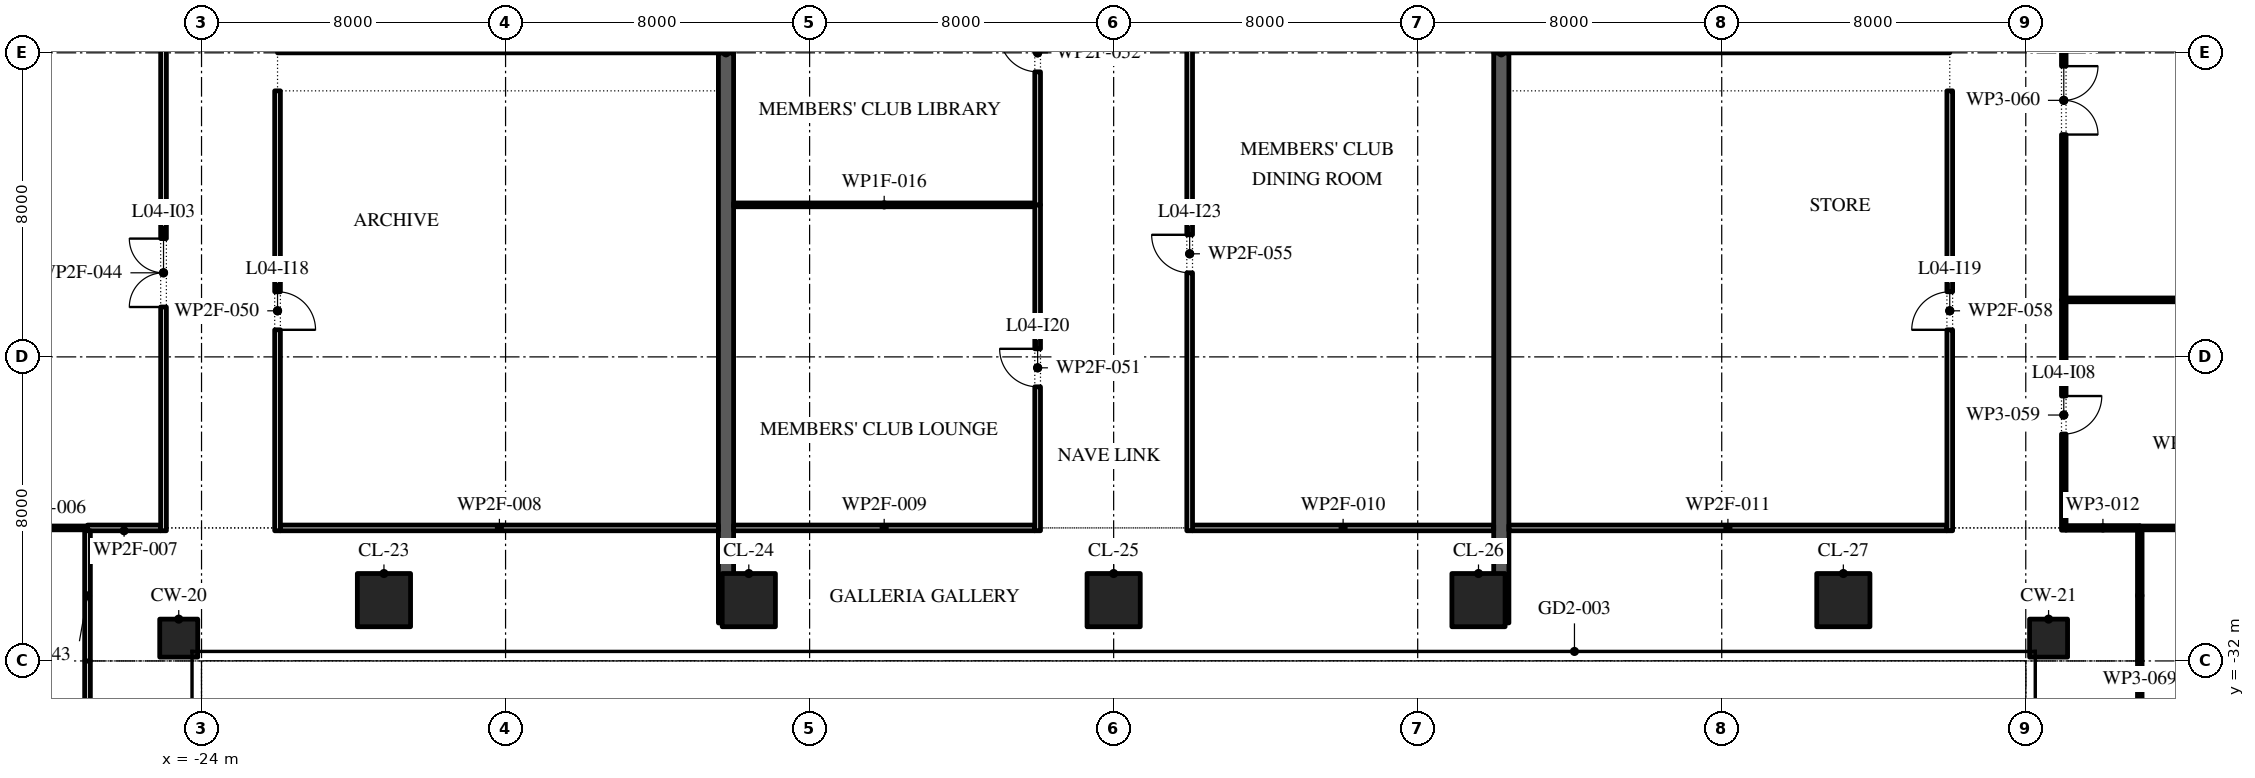
"""IFC4 building model, lengths in metres.
Left out: names, types, materials, properties, quantities, classifications, styles, units other than length and angle.
Written with IfcOpenShell. Run it as: python <this file> out.ifc"""

import sys

from ifc_helpers import new_model, si_unit, direction, frame, frame_2d, origin, origin_2d, place, context, subcontext, project, spatial, rectangle, extrude, element, fill, save


model = new_model("IFC4")
c1 = context("Model", 3, precision=1e-05, world=origin(), true_north=direction((0.0, 1.0)))
c2 = subcontext(c1, "Body", "Model", "MODEL_VIEW")
j1 = project(units=[si_unit("LENGTHUNIT", "METRE"), si_unit("PLANEANGLEUNIT", "RADIAN")], contexts=[c1])
p1 = place(None, origin())
s1 = spatial("IfcSite", under=j1, at=p1, CompositionType="ELEMENT")
p2 = place(p1, origin())
s2 = spatial("IfcBuilding", under=s1, at=p2, CompositionType="ELEMENT")
p3 = place(p2, frame((0.0, 0.0, 24.0)))
s3 = spatial("IfcBuildingStorey", under=s2, at=p3, CompositionType="ELEMENT", Elevation=24.0)
for number, where, z_axis, x_axis in (
    (1, (-24.6, -31.4, 0.0), (0.0, 0.0, 1.0), (1.0, 0.0, 0.0)),
    (2, (24.6, -31.4, 0.0), (0.0, 0.0, 1.0), (1.0, 0.0, 0.0)),
):
    element("IfcColumn", number, at=place(p3, frame(where, z_axis=z_axis, x_axis=x_axis)), inside=s3, PredefinedType="COLUMN", context=c2, shape_type="SweptSolid", body=[
        extrude(rectangle(XDim=1.0, YDim=1.0, at=origin_2d()), origin(), (0.0, 0.0, 1.0), 4.8),
    ])
for number, where, z_axis, x_axis in (
    (3, (-19.2, -30.4, 0.0), (0.0, 0.0, 1.0), (1.0, 0.0, 0.0)),
    (4, (-9.6, -30.4, 0.0), (0.0, 0.0, 1.0), (1.0, 0.0, 0.0)),
    (5, (0.0, -30.4, 0.0), (0.0, 0.0, 1.0), (1.0, 0.0, 0.0)),
    (6, (9.6, -30.4, 0.0), (0.0, 0.0, 1.0), (1.0, 0.0, 0.0)),
    (7, (19.2, -30.4, 0.0), (0.0, 0.0, 1.0), (1.0, 0.0, 0.0)),
):
    element("IfcColumn", number, at=place(p3, frame(where, z_axis=z_axis, x_axis=x_axis)), inside=s3, PredefinedType="COLUMN", context=c2, shape_type="SweptSolid", body=[
        extrude(rectangle(XDim=1.4, YDim=1.4, at=origin_2d()), origin(), (0.0, 0.0, 1.0), 4.8),
    ])
for number, where, z_axis, x_axis in (
    (8, (-10.2, -31.0, 0.0), (0.0, 0.0, 1.0), (0.0, 1.0, 0.0)),
    (9, (10.2, -31.0, 0.0), (0.0, 0.0, 1.0), (0.0, 1.0, 0.0)),
):
    element("IfcWall", number, at=place(p3, frame(where, z_axis=z_axis, x_axis=x_axis)), inside=s3, PredefinedType="SHEAR", context=c2, shape_type="SweptSolid", body=[
        extrude(rectangle(XDim=15.0, YDim=0.4, at=frame_2d((7.5, 0.0))), origin(), (0.0, 0.0, 1.0), 4.5),
    ])
p4 = place(p3, frame((-29.9, -28.5, 0.0), z_axis=(0.0, 0.0, 1.0), x_axis=(1.0, 0.0, 0.0)))
e10 = element("IfcWall", 10, at=p4, inside=s3, PredefinedType="PARTITIONING", context=c2, shape_type="SweptSolid", body=[
    extrude(rectangle(XDim=2.9, YDim=0.1, at=frame_2d((1.45, 0.0))), origin(), (0.0, 0.0, 1.0), 4.5),
])
p5 = place(p3, frame((-27.0, -28.5, 0.0), z_axis=(0.0, 0.0, 1.0), x_axis=(1.0, 0.0, 0.0)))
e11 = element("IfcWall", 11, at=p5, inside=s3, PredefinedType="PARTITIONING", context=c2, shape_type="SweptSolid", body=[
    extrude(rectangle(XDim=1.925, YDim=0.15, at=frame_2d((0.962, 0.0))), origin(), (0.0, 0.0, 1.0), 4.5),
])
p6 = place(p3, frame((-21.925, -28.5, 0.0), z_axis=(0.0, 0.0, 1.0), x_axis=(1.0, 0.0, 0.0)))
e12 = element("IfcWall", 12, at=p6, inside=s3, PredefinedType="PARTITIONING", context=c2, shape_type="SweptSolid", body=[
    extrude(rectangle(XDim=11.525, YDim=0.15, at=frame_2d((5.763, 0.0))), origin(), (0.0, 0.0, 1.0), 4.5),
])
for number, where, z_axis, x_axis in (
    (13, (-10.0, -28.5, 0.0), (0.0, 0.0, 1.0), (1.0, 0.0, 0.0)),
    (14, (2.075, -28.5, 0.0), (0.0, 0.0, 1.0), (1.0, 0.0, 0.0)),
):
    element("IfcWall", number, at=place(p3, frame(where, z_axis=z_axis, x_axis=x_axis)), inside=s3, PredefinedType="PARTITIONING", context=c2, shape_type="SweptSolid", body=[
        extrude(rectangle(XDim=7.925, YDim=0.15, at=frame_2d((3.962, 0.0))), origin(), (0.0, 0.0, 1.0), 4.5),
    ])
p7 = place(p3, frame((10.4, -28.5, 0.0), z_axis=(0.0, 0.0, 1.0), x_axis=(1.0, 0.0, 0.0)))
e15 = element("IfcWall", 15, at=p7, inside=s3, PredefinedType="PARTITIONING", context=c2, shape_type="SweptSolid", body=[
    extrude(rectangle(XDim=11.525, YDim=0.15, at=frame_2d((5.763, 0.0))), origin(), (0.0, 0.0, 1.0), 4.5),
])
p8 = place(p3, frame((25.06, -28.5, 0.0), z_axis=(0.0, 0.0, 1.0), x_axis=(1.0, 0.0, 0.0)))
e16 = element("IfcWall", 16, at=p8, inside=s3, PredefinedType="PARTITIONING", context=c2, shape_type="SweptSolid", body=[
    extrude(rectangle(XDim=1.94, YDim=0.12, at=frame_2d((0.97, 0.0))), origin(), (0.0, 0.0, 1.0), 4.5),
])
p9 = place(p3, frame((27.0, -28.5, 0.0), z_axis=(0.0, 0.0, 1.0), x_axis=(1.0, 0.0, 0.0)))
e17 = element("IfcWall", 17, at=p9, inside=s3, PredefinedType="PARTITIONING", context=c2, shape_type="SweptSolid", body=[
    extrude(rectangle(XDim=2.9, YDim=0.1, at=frame_2d((1.45, 0.0))), origin(), (0.0, 0.0, 1.0), 4.5),
])
p10 = place(p3, frame((25.06, -22.5, 0.0), z_axis=(0.0, 0.0, 1.0), x_axis=(1.0, 0.0, 0.0)))
e18 = element("IfcWall", 18, at=p10, inside=s3, PredefinedType="PARTITIONING", context=c2, shape_type="SweptSolid", body=[
    extrude(rectangle(XDim=18.44, YDim=0.1, at=frame_2d((9.22, 0.0))), origin(), (0.0, 0.0, 1.0), 4.5),
])
p11 = place(p3, frame((-10.0, -20.0, 0.0), z_axis=(0.0, 0.0, 1.0), x_axis=(1.0, 0.0, 0.0)))
e19 = element("IfcWall", 19, at=p11, inside=s3, PredefinedType="PARTITIONING", context=c2, shape_type="SweptSolid", body=[
    extrude(rectangle(XDim=7.925, YDim=0.1, at=frame_2d((3.962, 0.0))), origin(), (0.0, 0.0, 1.0), 4.5),
])
p12 = place(p3, frame((-27.0, -42.0, 0.0), z_axis=(0.0, 0.0, 1.0), x_axis=(0.0, 1.0, 0.0)))
e20 = element("IfcWall", 20, at=p12, inside=s3, PredefinedType="PARTITIONING", context=c2, shape_type="SweptSolid", body=[
    extrude(rectangle(XDim=10.0, YDim=0.15, at=frame_2d((5.0, 0.0))), origin(), (0.0, 0.0, 1.0), 4.5),
])
p13 = place(p12, frame((4.1, 0.0, 0.0)))
e21 = element("IfcOpeningElement", 21, at=p13, cuts=e20, PredefinedType="OPENING", context=c2, shape_type="SweptSolid", body=[
    extrude(rectangle(XDim=1.8, YDim=2.1, at=frame_2d((0.9, 1.05))), frame((0.0, 0.085, 0.0), z_axis=(0.0, -1.0, 0.0), x_axis=(1.0, 0.0, 0.0)), (0.0, 0.0, 1.0), 0.17),
])
p14 = place(p3, frame((-27.0, -32.0, 0.0), z_axis=(0.0, 0.0, 1.0), x_axis=(0.0, 1.0, 0.0)))
e22 = element("IfcWall", 22, at=p14, inside=s3, PredefinedType="PARTITIONING", context=c2, shape_type="SweptSolid", body=[
    extrude(rectangle(XDim=3.425, YDim=0.15, at=frame_2d((1.712, 0.0))), origin(), (0.0, 0.0, 1.0), 4.5),
])
p15 = place(p3, frame((-25.0, -28.575, 0.0), z_axis=(0.0, 0.0, 1.0), x_axis=(0.0, 1.0, 0.0)))
e23 = element("IfcWall", 23, at=p15, inside=s3, PredefinedType="PARTITIONING", context=c2, shape_type="SweptSolid", body=[
    extrude(rectangle(XDim=13.575, YDim=0.15, at=frame_2d((6.788, 0.0))), origin(), (0.0, 0.0, 1.0), 4.5),
])
p16 = place(p15, frame((5.887, 0.0, 0.0)))
e24 = element("IfcOpeningElement", 24, at=p16, cuts=e23, PredefinedType="OPENING", context=c2, shape_type="SweptSolid", body=[
    extrude(rectangle(XDim=1.8, YDim=2.1, at=frame_2d((0.9, 1.05))), frame((0.0, 0.085, 0.0), z_axis=(0.0, -1.0, 0.0), x_axis=(1.0, 0.0, 0.0)), (0.0, 0.0, 1.0), 0.17),
])
p17 = place(p3, frame((-22.0, -28.575, 0.0), z_axis=(0.0, 0.0, 1.0), x_axis=(0.0, 1.0, 0.0)))
e25 = element("IfcWall", 25, at=p17, inside=s3, PredefinedType="PARTITIONING", context=c2, shape_type="SweptSolid", body=[
    extrude(rectangle(XDim=11.575, YDim=0.15, at=frame_2d((5.788, 0.0))), origin(), (0.0, 0.0, 1.0), 4.5),
])
p18 = place(p17, frame((5.288, 0.0, 0.0)))
e26 = element("IfcOpeningElement", 26, at=p18, cuts=e25, PredefinedType="OPENING", context=c2, shape_type="SweptSolid", body=[
    extrude(rectangle(XDim=1.0, YDim=2.1, at=frame_2d((0.5, 1.05))), frame((0.0, 0.085, 0.0), z_axis=(0.0, -1.0, 0.0), x_axis=(1.0, 0.0, 0.0)), (0.0, 0.0, 1.0), 0.17),
])
p19 = place(p3, frame((-2.0, -28.575, 0.0), z_axis=(0.0, 0.0, 1.0), x_axis=(0.0, 1.0, 0.0)))
e27 = element("IfcWall", 27, at=p19, inside=s3, PredefinedType="PARTITIONING", context=c2, shape_type="SweptSolid", body=[
    extrude(rectangle(XDim=8.575, YDim=0.15, at=frame_2d((4.288, 0.0))), origin(), (0.0, 0.0, 1.0), 4.5),
])
p20 = place(p19, frame((3.788, 0.0, 0.0)))
e28 = element("IfcOpeningElement", 28, at=p20, cuts=e27, PredefinedType="OPENING", context=c2, shape_type="SweptSolid", body=[
    extrude(rectangle(XDim=1.0, YDim=2.1, at=frame_2d((0.5, 1.05))), frame((0.0, 0.085, 0.0), z_axis=(0.0, -1.0, 0.0), x_axis=(1.0, 0.0, 0.0)), (0.0, 0.0, 1.0), 0.17),
])
p21 = place(p3, frame((-2.0, -20.0, 0.0), z_axis=(0.0, 0.0, 1.0), x_axis=(0.0, 1.0, 0.0)))
e29 = element("IfcWall", 29, at=p21, inside=s3, PredefinedType="PARTITIONING", context=c2, shape_type="SweptSolid", body=[
    extrude(rectangle(XDim=8.0, YDim=0.15, at=frame_2d((4.0, 0.0))), origin(), (0.0, 0.0, 1.0), 4.5),
])
p22 = place(p21, frame((3.5, 0.0, 0.0)))
e30 = element("IfcOpeningElement", 30, at=p22, cuts=e29, PredefinedType="OPENING", context=c2, shape_type="SweptSolid", body=[
    extrude(rectangle(XDim=1.0, YDim=2.1, at=frame_2d((0.5, 1.05))), frame((0.0, 0.085, 0.0), z_axis=(0.0, -1.0, 0.0), x_axis=(1.0, 0.0, 0.0)), (0.0, 0.0, 1.0), 0.17),
])
p23 = place(p3, frame((2.0, -28.575, 0.0), z_axis=(0.0, 0.0, 1.0), x_axis=(0.0, 1.0, 0.0)))
e31 = element("IfcWall", 31, at=p23, inside=s3, PredefinedType="PARTITIONING", context=c2, shape_type="SweptSolid", body=[
    extrude(rectangle(XDim=14.575, YDim=0.15, at=frame_2d((7.288, 0.0))), origin(), (0.0, 0.0, 1.0), 4.5),
])
p24 = place(p23, frame((6.788, 0.0, 0.0)))
e32 = element("IfcOpeningElement", 32, at=p24, cuts=e31, PredefinedType="OPENING", context=c2, shape_type="SweptSolid", body=[
    extrude(rectangle(XDim=1.0, YDim=2.1, at=frame_2d((0.5, 1.05))), frame((0.0, 0.085, 0.0), z_axis=(0.0, -1.0, 0.0), x_axis=(1.0, 0.0, 0.0)), (0.0, 0.0, 1.0), 0.17),
])
p25 = place(p3, frame((22.0, -28.575, 0.0), z_axis=(0.0, 0.0, 1.0), x_axis=(0.0, 1.0, 0.0)))
e33 = element("IfcWall", 33, at=p25, inside=s3, PredefinedType="PARTITIONING", context=c2, shape_type="SweptSolid", body=[
    extrude(rectangle(XDim=11.575, YDim=0.15, at=frame_2d((5.788, 0.0))), origin(), (0.0, 0.0, 1.0), 4.5),
])
p26 = place(p25, frame((5.288, 0.0, 0.0)))
e34 = element("IfcOpeningElement", 34, at=p26, cuts=e33, PredefinedType="OPENING", context=c2, shape_type="SweptSolid", body=[
    extrude(rectangle(XDim=1.0, YDim=2.1, at=frame_2d((0.5, 1.05))), frame((0.0, 0.085, 0.0), z_axis=(0.0, -1.0, 0.0), x_axis=(1.0, 0.0, 0.0)), (0.0, 0.0, 1.0), 0.17),
])
p27 = place(p3, frame((25.0, -28.56, 0.0), z_axis=(0.0, 0.0, 1.0), x_axis=(0.0, 1.0, 0.0)))
e35 = element("IfcWall", 35, at=p27, inside=s3, PredefinedType="PARTITIONING", context=c2, shape_type="SweptSolid", body=[
    extrude(rectangle(XDim=6.06, YDim=0.12, at=frame_2d((3.03, 0.0))), origin(), (0.0, 0.0, 1.0), 4.5),
])
p28 = place(p27, frame((2.53, 0.0, 0.0)))
e36 = element("IfcOpeningElement", 36, at=p28, cuts=e35, PredefinedType="OPENING", context=c2, shape_type="SweptSolid", body=[
    extrude(rectangle(XDim=1.0, YDim=2.1, at=frame_2d((0.5, 1.05))), frame((0.0, 0.07, 0.0), z_axis=(0.0, -1.0, 0.0), x_axis=(1.0, 0.0, 0.0)), (0.0, 0.0, 1.0), 0.14),
])
p29 = place(p3, frame((25.0, -22.5, 0.0), z_axis=(0.0, 0.0, 1.0), x_axis=(0.0, 1.0, 0.0)))
e37 = element("IfcWall", 37, at=p29, inside=s3, PredefinedType="PARTITIONING", context=c2, shape_type="SweptSolid", body=[
    extrude(rectangle(XDim=10.5, YDim=0.12, at=frame_2d((5.25, 0.0))), origin(), (0.0, 0.0, 1.0), 4.5),
])
p30 = place(p29, frame((4.35, 0.0, 0.0)))
e38 = element("IfcOpeningElement", 38, at=p30, cuts=e37, PredefinedType="OPENING", context=c2, shape_type="SweptSolid", body=[
    extrude(rectangle(XDim=1.8, YDim=2.1, at=frame_2d((0.9, 1.05))), frame((0.0, 0.07, 0.0), z_axis=(0.0, -1.0, 0.0), x_axis=(1.0, 0.0, 0.0)), (0.0, 0.0, 1.0), 0.14),
])
p31 = place(p3, frame((27.0, -42.0, 0.0), z_axis=(0.0, 0.0, 1.0), x_axis=(0.0, 1.0, 0.0)))
e39 = element("IfcWall", 39, at=p31, inside=s3, PredefinedType="PARTITIONING", context=c2, shape_type="SweptSolid", body=[
    extrude(rectangle(XDim=10.0, YDim=0.12, at=frame_2d((5.0, 0.0))), origin(), (0.0, 0.0, 1.0), 4.5),
])
p32 = place(p31, frame((4.1, 0.0, 0.0)))
e40 = element("IfcOpeningElement", 40, at=p32, cuts=e39, PredefinedType="OPENING", context=c2, shape_type="SweptSolid", body=[
    extrude(rectangle(XDim=1.8, YDim=2.1, at=frame_2d((0.9, 1.05))), frame((0.0, 0.07, 0.0), z_axis=(0.0, -1.0, 0.0), x_axis=(1.0, 0.0, 0.0)), (0.0, 0.0, 1.0), 0.14),
])
p33 = place(p3, frame((27.0, -32.0, 0.0), z_axis=(0.0, 0.0, 1.0), x_axis=(0.0, 1.0, 0.0)))
e41 = element("IfcWall", 41, at=p33, inside=s3, PredefinedType="PARTITIONING", context=c2, shape_type="SweptSolid", body=[
    extrude(rectangle(XDim=3.44, YDim=0.12, at=frame_2d((1.72, 0.0))), origin(), (0.0, 0.0, 1.0), 4.5),
])
p34 = place(p16, origin())
e42 = element("IfcDoor", 42, at=p34, inside=s3, OperationType="SINGLE_SWING_LEFT", PredefinedType="DOOR", context=c2, shape_type="SweptSolid", body=[
    extrude(rectangle(XDim=1.8, YDim=2.1, at=frame_2d((0.9, 1.05))), frame((0.0, 0.025, 0.0), z_axis=(0.0, -1.0, 0.0), x_axis=(1.0, 0.0, 0.0)), (0.0, 0.0, 1.0), 0.05),
])
fill(e24, e42)
p35 = place(p28, frame((1.0, 0.0, 0.0), z_axis=(0.0, 0.0, 1.0), x_axis=(-1.0, 0.0, 0.0)))
e43 = element("IfcDoor", 43, at=p35, inside=s3, OperationType="SINGLE_SWING_RIGHT", PredefinedType="DOOR", context=c2, shape_type="SweptSolid", body=[
    extrude(rectangle(XDim=1.0, YDim=2.1, at=frame_2d((0.5, 1.05))), frame((0.0, 0.025, 0.0), z_axis=(0.0, -1.0, 0.0), x_axis=(1.0, 0.0, 0.0)), (0.0, 0.0, 1.0), 0.05),
])
fill(e36, e43)
p36 = place(p30, frame((1.8, 0.0, 0.0), z_axis=(0.0, 0.0, 1.0), x_axis=(-1.0, 0.0, 0.0)))
e44 = element("IfcDoor", 44, at=p36, inside=s3, OperationType="SINGLE_SWING_RIGHT", PredefinedType="DOOR", context=c2, shape_type="SweptSolid", body=[
    extrude(rectangle(XDim=1.8, YDim=2.1, at=frame_2d((0.9, 1.05))), frame((0.0, 0.025, 0.0), z_axis=(0.0, -1.0, 0.0), x_axis=(1.0, 0.0, 0.0)), (0.0, 0.0, 1.0), 0.05),
])
fill(e38, e44)
p37 = place(p18, frame((1.0, 0.0, 0.0), z_axis=(0.0, 0.0, 1.0), x_axis=(-1.0, 0.0, 0.0)))
e45 = element("IfcDoor", 45, at=p37, inside=s3, OperationType="SINGLE_SWING_LEFT", PredefinedType="DOOR", context=c2, shape_type="SweptSolid", body=[
    extrude(rectangle(XDim=1.0, YDim=2.1, at=frame_2d((0.5, 1.05))), frame((0.0, 0.025, 0.0), z_axis=(0.0, -1.0, 0.0), x_axis=(1.0, 0.0, 0.0)), (0.0, 0.0, 1.0), 0.05),
])
fill(e26, e45)
p38 = place(p26, origin())
e46 = element("IfcDoor", 46, at=p38, inside=s3, OperationType="SINGLE_SWING_RIGHT", PredefinedType="DOOR", context=c2, shape_type="SweptSolid", body=[
    extrude(rectangle(XDim=1.0, YDim=2.1, at=frame_2d((0.5, 1.05))), frame((0.0, 0.025, 0.0), z_axis=(0.0, -1.0, 0.0), x_axis=(1.0, 0.0, 0.0)), (0.0, 0.0, 1.0), 0.05),
])
fill(e34, e46)
p39 = place(p20, origin())
e47 = element("IfcDoor", 47, at=p39, inside=s3, OperationType="SINGLE_SWING_LEFT", PredefinedType="DOOR", context=c2, shape_type="SweptSolid", body=[
    extrude(rectangle(XDim=1.0, YDim=2.1, at=frame_2d((0.5, 1.05))), frame((0.0, 0.025, 0.0), z_axis=(0.0, -1.0, 0.0), x_axis=(1.0, 0.0, 0.0)), (0.0, 0.0, 1.0), 0.05),
])
fill(e28, e47)
p40 = place(p22, origin())
e48 = element("IfcDoor", 48, at=p40, inside=s3, OperationType="SINGLE_SWING_LEFT", PredefinedType="DOOR", context=c2, shape_type="SweptSolid", body=[
    extrude(rectangle(XDim=1.0, YDim=2.1, at=frame_2d((0.5, 1.05))), frame((0.0, 0.025, 0.0), z_axis=(0.0, -1.0, 0.0), x_axis=(1.0, 0.0, 0.0)), (0.0, 0.0, 1.0), 0.05),
])
fill(e30, e48)
p41 = place(p24, origin())
e49 = element("IfcDoor", 49, at=p41, inside=s3, OperationType="SINGLE_SWING_LEFT", PredefinedType="DOOR", context=c2, shape_type="SweptSolid", body=[
    extrude(rectangle(XDim=1.0, YDim=2.1, at=frame_2d((0.5, 1.05))), frame((0.0, 0.025, 0.0), z_axis=(0.0, -1.0, 0.0), x_axis=(1.0, 0.0, 0.0)), (0.0, 0.0, 1.0), 0.05),
])
fill(e32, e49)
save(model, sys.argv[1])
